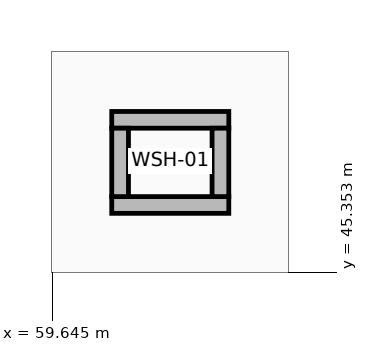
"""IFC4 building model, lengths in metres.
Left out: names, types, materials, properties, quantities, classifications, styles, units other than length and angle.
Written with IfcOpenShell. Run it as: python <this file> out.ifc"""

import sys

from ifc_helpers import new_model, si_unit, direction, frame, frame_2d, origin, place, context, subcontext, project, spatial, rectangle, extrude, element, save


model = new_model("IFC4")
c1 = context("Model", 3, precision=1e-05, world=origin(), true_north=direction((0.0, 1.0)))
c2 = subcontext(c1, "Body", "Model", "MODEL_VIEW")
j1 = project(units=[si_unit("LENGTHUNIT", "METRE"), si_unit("PLANEANGLEUNIT", "RADIAN")], contexts=[c1])
p1 = place(None, origin())
s1 = spatial("IfcSite", under=j1, at=p1, CompositionType="ELEMENT")
p2 = place(p1, origin())
s2 = spatial("IfcBuilding", under=s1, at=p2, CompositionType="ELEMENT")
p3 = place(p2, origin())
s3 = spatial("IfcBuildingStorey", under=s2, at=p3, CompositionType="ELEMENT", Elevation=0.0)
for number, where, z_axis, x_axis in (
    (1, (60.43, 46.24, 0.0), (0.0, 0.0, 1.0), (1.0, 0.0, 0.0)),
    (2, (60.43, 47.36, 0.0), (0.0, 0.0, 1.0), (1.0, 0.0, 0.0)),
):
    element("IfcWall", number, at=place(p3, frame(where, z_axis=z_axis, x_axis=x_axis)), inside=s3, PredefinedType="STANDARD", context=c2, shape_type="SweptSolid", body=[
        extrude(rectangle(XDim=1.54, YDim=0.22, at=frame_2d((0.77, 0.0))), origin(), (0.0, 0.0, 1.0), 2.6),
    ])
for number, where, z_axis, x_axis in (
    (3, (60.54, 46.35, 0.0), (0.0, 0.0, 1.0), (0.0, 1.0, 0.0)),
    (4, (61.86, 46.35, 0.0), (0.0, 0.0, 1.0), (0.0, 1.0, 0.0)),
):
    element("IfcWall", number, at=place(p3, frame(where, z_axis=z_axis, x_axis=x_axis)), inside=s3, PredefinedType="STANDARD", context=c2, shape_type="SweptSolid", body=[
        extrude(rectangle(XDim=0.9, YDim=0.22, at=frame_2d((0.45, 0.0))), origin(), (0.0, 0.0, 1.0), 2.6),
    ])
save(model, sys.argv[1])
